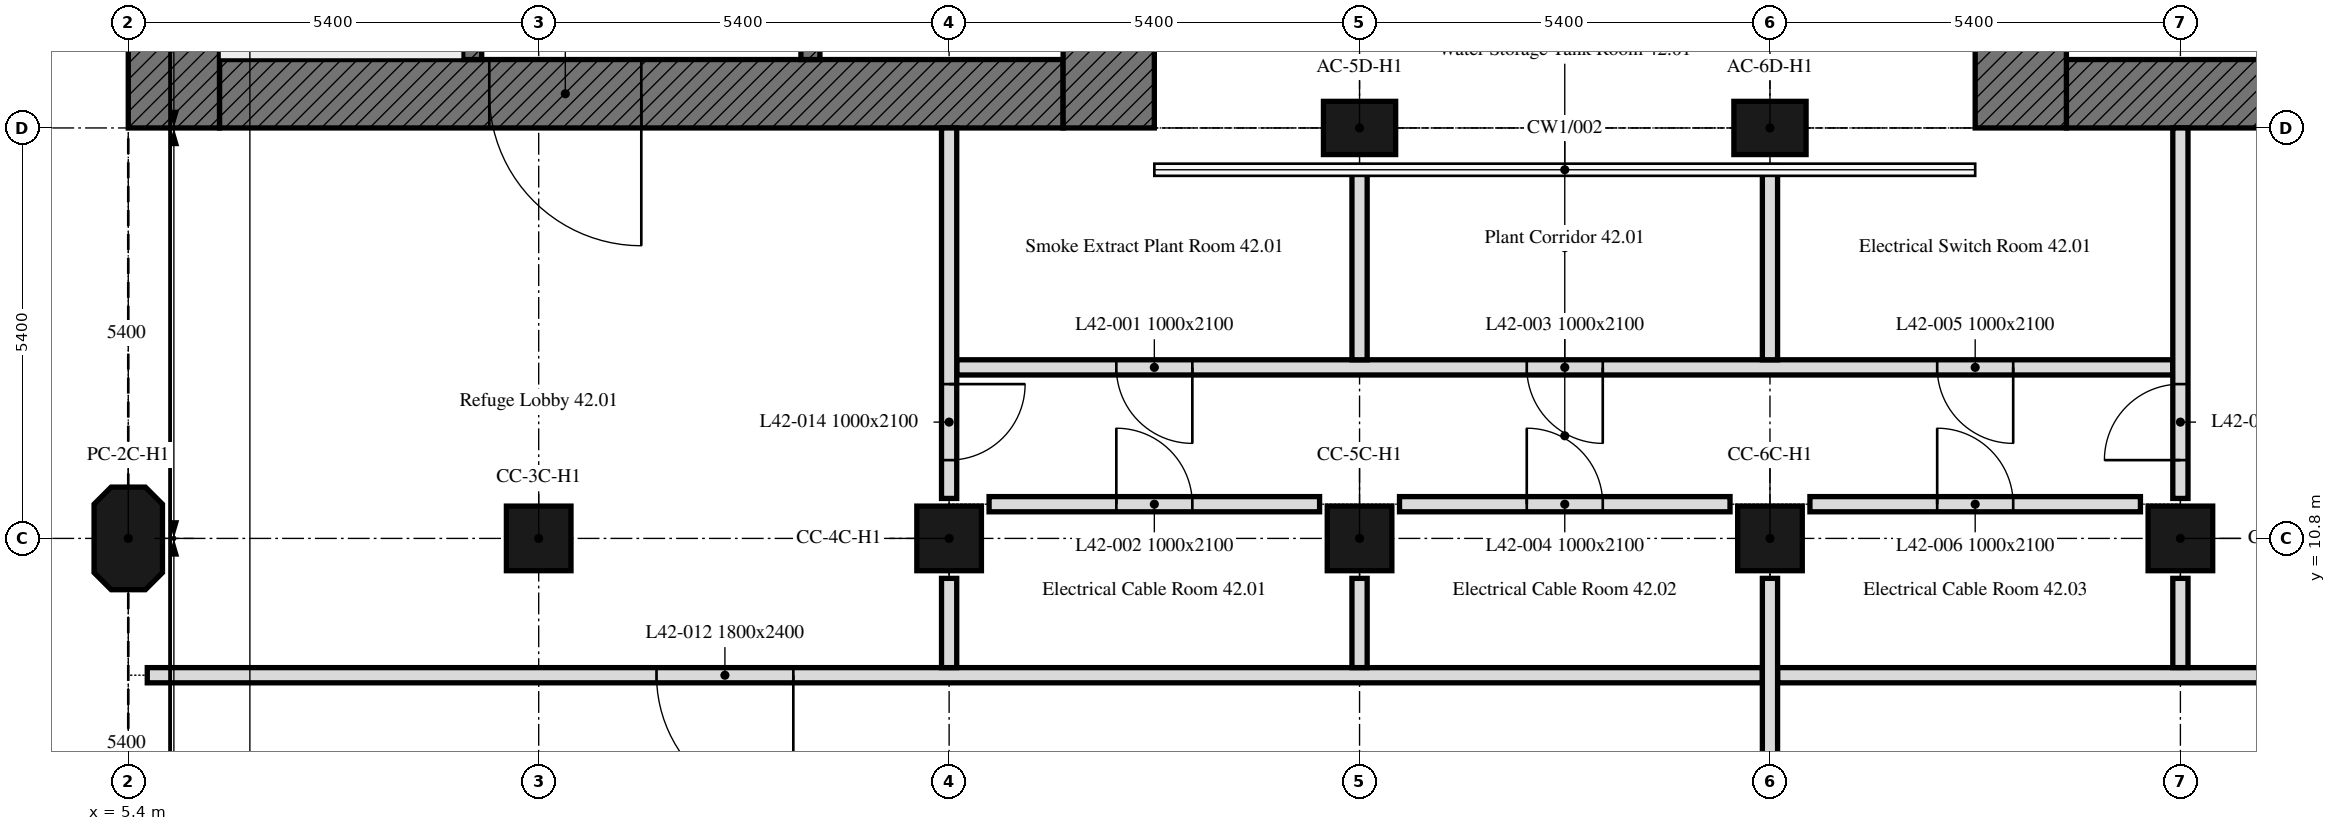
"""IFC4 building model, lengths in metres.
Left out: names, types, materials, properties, quantities, classifications, styles, units other than length and angle.
Written with IfcOpenShell. Run it as: python <this file> out.ifc"""

import sys

from ifc_helpers import new_model, si_unit, direction, frame, frame_2d, origin, origin_2d, place, context, subcontext, project, spatial, polyline, rectangle, outline, extrude, element, fill, save


model = new_model("IFC4")
c1 = context("Model", 3, precision=1e-05, world=origin(), true_north=direction((0.0, 1.0)))
c2 = subcontext(c1, "Body", "Model", "MODEL_VIEW")
j1 = project(units=[si_unit("LENGTHUNIT", "METRE"), si_unit("PLANEANGLEUNIT", "RADIAN")], contexts=[c1])
p1 = place(None, origin())
s1 = spatial("IfcSite", under=j1, at=p1, CompositionType="ELEMENT")
p2 = place(p1, origin())
s2 = spatial("IfcBuilding", under=s1, at=p2, CompositionType="ELEMENT")
p3 = place(p2, frame((0.0, 0.0, 175.9)))
s3 = spatial("IfcBuildingStorey", under=s2, at=p3, CompositionType="ELEMENT", Elevation=175.9)
p4 = place(p3, frame((5.4, 10.8, 0.0), z_axis=(0.0, 0.0, 1.0), x_axis=(0.0, 1.0, 0.0)))
e1 = element("IfcColumn", 1, at=p4, inside=s3, PredefinedType="COLUMN", context=c2, shape_type="SweptSolid", body=[
    extrude(outline(polyline([(-0.45, -0.45), (0.45, -0.45), (0.675, -0.225), (0.675, 0.225), (0.45, 0.45), (-0.45, 0.45), (-0.675, 0.225), (-0.675, -0.225), (-0.45, -0.45)])), origin(), (0.0, 0.0, 1.0), 4.5),
])
for number, where, z_axis, x_axis in (
    (2, (10.8, 10.8, 0.0), (0.0, 0.0, 1.0), (1.0, 0.0, 0.0)),
    (3, (16.2, 10.8, 0.0), (0.0, 0.0, 1.0), (1.0, 0.0, 0.0)),
    (4, (21.6, 10.8, 0.0), (0.0, 0.0, 1.0), (1.0, 0.0, 0.0)),
    (5, (27.0, 10.8, 0.0), (0.0, 0.0, 1.0), (1.0, 0.0, 0.0)),
    (6, (32.4, 10.8, 0.0), (0.0, 0.0, 1.0), (1.0, 0.0, 0.0)),
):
    element("IfcColumn", number, at=place(p3, frame(where, z_axis=z_axis, x_axis=x_axis)), inside=s3, PredefinedType="COLUMN", context=c2, shape_type="SweptSolid", body=[
        extrude(rectangle(XDim=0.85, YDim=0.85, at=origin_2d()), origin(), (0.0, 0.0, 1.0), 4.5),
    ])
for number, where, z_axis, x_axis in (
    (7, (21.6, 16.2, 0.0), (0.0, 0.0, 1.0), (1.0, 0.0, 0.0)),
    (8, (27.0, 16.2, 0.0), (0.0, 0.0, 1.0), (1.0, 0.0, 0.0)),
):
    element("IfcColumn", number, at=place(p3, frame(where, z_axis=z_axis, x_axis=x_axis)), inside=s3, PredefinedType="COLUMN", context=c2, shape_type="SweptSolid", body=[
        extrude(rectangle(XDim=0.95, YDim=0.7, at=origin_2d()), origin(), (0.0, 0.0, 1.0), 4.5),
    ])
p5 = place(p3, frame((17.7, 16.65, 0.0), z_axis=(0.0, 0.0, 1.0), x_axis=(-1.0, 0.0, 0.0)))
e9 = element("IfcWall", 9, at=p5, inside=s3, PredefinedType="SOLIDWALL", context=c2, shape_type="SweptSolid", body=[
    extrude(rectangle(XDim=11.1, YDim=0.9, at=frame_2d((5.55, 0.0))), origin(), (0.0, 0.0, 1.0), 4.5),
])
p6 = place(p5, frame((5.55, 0.0, 0.0)))
e10 = element("IfcOpeningElement", 10, at=p6, cuts=e9, PredefinedType="OPENING", context=c2, shape_type="SweptSolid", body=[
    extrude(rectangle(XDim=2.0, YDim=2.4, at=frame_2d((1.0, 1.2))), frame((0.0, 0.45, 0.0), z_axis=(0.0, -1.0, 0.0), x_axis=(1.0, 0.0, 0.0)), (0.0, 0.0, 1.0), 0.9),
])
for number, where, z_axis, x_axis in (
    (11, (6.0, 16.2, 0.0), (0.0, 0.0, 1.0), (0.0, 1.0, 0.0)),
    (12, (18.3, 32.4, 0.0), (0.0, 0.0, 1.0), (0.0, -1.0, 0.0)),
):
    element("IfcWall", number, at=place(p3, frame(where, z_axis=z_axis, x_axis=x_axis)), inside=s3, PredefinedType="SOLIDWALL", context=c2, shape_type="SweptSolid", body=[
        extrude(rectangle(XDim=16.2, YDim=1.2, at=frame_2d((8.1, 0.0))), origin(), (0.0, 0.0, 1.0), 4.5),
    ])
p7 = place(p3, frame((9.925, 17.1, 0.0), z_axis=(0.0, 0.0, 1.0), x_axis=(0.0, 1.0, 0.0)))
e13 = element("IfcWall", 13, at=p7, inside=s3, PredefinedType="SOLIDWALL", context=c2, shape_type="SweptSolid", body=[
    extrude(rectangle(XDim=14.4, YDim=0.25, at=frame_2d((7.2, 0.0))), origin(), (0.0, 0.0, 1.0), 4.5),
])
p8 = place(p7, frame((4.6, 0.0, 0.0)))
e14 = element("IfcOpeningElement", 14, at=p8, cuts=e13, PredefinedType="OPENING", context=c2, shape_type="SweptSolid", body=[
    extrude(rectangle(XDim=1.0, YDim=2.1, at=frame_2d((0.5, 1.05))), frame((0.0, 0.125, 0.0), z_axis=(0.0, -1.0, 0.0), x_axis=(1.0, 0.0, 0.0)), (0.0, 0.0, 1.0), 0.25),
])
p9 = place(p7, frame((7.062, 0.0, 0.0)))
e15 = element("IfcOpeningElement", 15, at=p9, cuts=e13, PredefinedType="OPENING", context=c2, shape_type="SweptSolid", body=[
    extrude(rectangle(XDim=1.2, YDim=2.1, at=frame_2d((0.6, 1.05))), frame((0.0, 0.125, 0.0), z_axis=(0.0, -1.0, 0.0), x_axis=(1.0, 0.0, 0.0)), (0.0, 0.0, 1.0), 0.25),
])
p10 = place(p7, frame((9.853, 0.0, 0.0)))
e16 = element("IfcOpeningElement", 16, at=p10, cuts=e13, PredefinedType="OPENING", context=c2, shape_type="SweptSolid", body=[
    extrude(rectangle(XDim=0.9, YDim=2.1, at=frame_2d((0.45, 1.05))), frame((0.0, 0.125, 0.0), z_axis=(0.0, -1.0, 0.0), x_axis=(1.0, 0.0, 0.0)), (0.0, 0.0, 1.0), 0.25),
])
p11 = place(p7, frame((11.667, 0.0, 0.0)))
e17 = element("IfcOpeningElement", 17, at=p11, cuts=e13, PredefinedType="OPENING", context=c2, shape_type="SweptSolid", body=[
    extrude(rectangle(XDim=0.9, YDim=2.1, at=frame_2d((0.45, 1.05))), frame((0.0, 0.125, 0.0), z_axis=(0.0, -1.0, 0.0), x_axis=(1.0, 0.0, 0.0)), (0.0, 0.0, 1.0), 0.25),
])
p12 = place(p7, frame((13.227, 0.0, 0.0)))
e18 = element("IfcOpeningElement", 18, at=p12, cuts=e13, PredefinedType="OPENING", context=c2, shape_type="SweptSolid", body=[
    extrude(rectangle(XDim=0.9, YDim=2.1, at=frame_2d((0.45, 1.05))), frame((0.0, 0.125, 0.0), z_axis=(0.0, -1.0, 0.0), x_axis=(1.0, 0.0, 0.0)), (0.0, 0.0, 1.0), 0.25),
])
p13 = place(p3, frame((14.375, 17.1, 0.0), z_axis=(0.0, 0.0, 1.0), x_axis=(0.0, 1.0, 0.0)))
e19 = element("IfcWall", 19, at=p13, inside=s3, PredefinedType="SOLIDWALL", context=c2, shape_type="SweptSolid", body=[
    extrude(rectangle(XDim=14.4, YDim=0.25, at=frame_2d((7.2, 0.0))), origin(), (0.0, 0.0, 1.0), 4.5),
])
p14 = place(p13, frame((13.15, 0.0, 0.0)))
e20 = element("IfcOpeningElement", 20, at=p14, cuts=e19, PredefinedType="OPENING", context=c2, shape_type="SweptSolid", body=[
    extrude(rectangle(XDim=1.0, YDim=2.1, at=frame_2d((0.5, 1.05))), frame((0.0, 0.125, 0.0), z_axis=(0.0, -1.0, 0.0), x_axis=(1.0, 0.0, 0.0)), (0.0, 0.0, 1.0), 0.25),
])
p15 = place(p13, frame((3.25, 0.0, 0.0)))
e21 = element("IfcOpeningElement", 21, at=p15, cuts=e19, PredefinedType="OPENING", context=c2, shape_type="SweptSolid", body=[
    extrude(rectangle(XDim=0.9, YDim=2.1, at=frame_2d((0.45, 1.05))), frame((0.0, 0.125, 0.0), z_axis=(0.0, -1.0, 0.0), x_axis=(1.0, 0.0, 0.0)), (0.0, 0.0, 1.0), 0.25),
])
p16 = place(p3, frame((42.0, 16.65, 0.0), z_axis=(0.0, 0.0, 1.0), x_axis=(-1.0, 0.0, 0.0)))
e22 = element("IfcWall", 22, at=p16, inside=s3, PredefinedType="SOLIDWALL", context=c2, shape_type="SweptSolid", body=[
    extrude(rectangle(XDim=11.1, YDim=0.9, at=frame_2d((5.55, 0.0))), origin(), (0.0, 0.0, 1.0), 4.5),
])
p17 = place(p16, frame((3.55, 0.0, 0.0)))
e23 = element("IfcOpeningElement", 23, at=p17, cuts=e22, PredefinedType="OPENING", context=c2, shape_type="SweptSolid", body=[
    extrude(rectangle(XDim=2.0, YDim=2.4, at=frame_2d((1.0, 1.2))), frame((0.0, 0.45, 0.0), z_axis=(0.0, -1.0, 0.0), x_axis=(1.0, 0.0, 0.0)), (0.0, 0.0, 1.0), 0.9),
])
p18 = place(p3, frame((30.3, 16.2, 0.0), z_axis=(0.0, 0.0, 1.0), x_axis=(0.0, 1.0, 0.0)))
e24 = element("IfcWall", 24, at=p18, inside=s3, PredefinedType="SOLIDWALL", context=c2, shape_type="SweptSolid", body=[
    extrude(rectangle(XDim=16.2, YDim=1.2, at=frame_2d((8.1, 0.0))), origin(), (0.0, 0.0, 1.0), 4.5),
])
p19 = place(p3, frame((16.726, 11.25, 0.0), z_axis=(0.0, 0.0, 1.0), x_axis=(1.0, 0.0, 0.0)))
e25 = element("IfcWall", 25, at=p19, inside=s3, PredefinedType="PARTITIONING", context=c2, shape_type="SweptSolid", body=[
    extrude(rectangle(XDim=4.349, YDim=0.2, at=frame_2d((2.174, 0.0))), origin(), (0.0, 0.0, 1.0), 4.5),
])
p20 = place(p19, frame((1.674, 0.0, 0.0)))
e26 = element("IfcOpeningElement", 26, at=p20, cuts=e25, PredefinedType="OPENING", context=c2, shape_type="SweptSolid", body=[
    extrude(rectangle(XDim=1.0, YDim=2.1, at=frame_2d((0.5, 1.05))), frame((0.0, 0.1, 0.0), z_axis=(0.0, -1.0, 0.0), x_axis=(1.0, 0.0, 0.0)), (0.0, 0.0, 1.0), 0.2),
])
p21 = place(p3, frame((22.126, 11.25, 0.0), z_axis=(0.0, 0.0, 1.0), x_axis=(1.0, 0.0, 0.0)))
e27 = element("IfcWall", 27, at=p21, inside=s3, PredefinedType="PARTITIONING", context=c2, shape_type="SweptSolid", body=[
    extrude(rectangle(XDim=4.349, YDim=0.2, at=frame_2d((2.174, 0.0))), origin(), (0.0, 0.0, 1.0), 4.5),
])
p22 = place(p21, frame((1.674, 0.0, 0.0)))
e28 = element("IfcOpeningElement", 28, at=p22, cuts=e27, PredefinedType="OPENING", context=c2, shape_type="SweptSolid", body=[
    extrude(rectangle(XDim=1.0, YDim=2.1, at=frame_2d((0.5, 1.05))), frame((0.0, 0.1, 0.0), z_axis=(0.0, -1.0, 0.0), x_axis=(1.0, 0.0, 0.0)), (0.0, 0.0, 1.0), 0.2),
])
p23 = place(p3, frame((27.526, 11.25, 0.0), z_axis=(0.0, 0.0, 1.0), x_axis=(1.0, 0.0, 0.0)))
e29 = element("IfcWall", 29, at=p23, inside=s3, PredefinedType="PARTITIONING", context=c2, shape_type="SweptSolid", body=[
    extrude(rectangle(XDim=4.349, YDim=0.2, at=frame_2d((2.174, 0.0))), origin(), (0.0, 0.0, 1.0), 4.5),
])
p24 = place(p23, frame((1.674, 0.0, 0.0)))
e30 = element("IfcOpeningElement", 30, at=p24, cuts=e29, PredefinedType="OPENING", context=c2, shape_type="SweptSolid", body=[
    extrude(rectangle(XDim=1.0, YDim=2.1, at=frame_2d((0.5, 1.05))), frame((0.0, 0.1, 0.0), z_axis=(0.0, -1.0, 0.0), x_axis=(1.0, 0.0, 0.0)), (0.0, 0.0, 1.0), 0.2),
])
p25 = place(p3, frame((32.3, 13.05, 0.0), z_axis=(0.0, 0.0, 1.0), x_axis=(-1.0, 0.0, 0.0)))
e31 = element("IfcWall", 31, at=p25, inside=s3, PredefinedType="PARTITIONING", context=c2, shape_type="SweptSolid", body=[
    extrude(rectangle(XDim=16.0, YDim=0.2, at=frame_2d((8.0, 0.0))), origin(), (0.0, 0.0, 1.0), 3.9),
])
p26 = place(p25, frame((12.9, 0.0, 0.0)))
e32 = element("IfcOpeningElement", 32, at=p26, cuts=e31, PredefinedType="OPENING", context=c2, shape_type="SweptSolid", body=[
    extrude(rectangle(XDim=1.0, YDim=2.1, at=frame_2d((0.5, 1.05))), frame((0.0, 0.1, 0.0), z_axis=(0.0, -1.0, 0.0), x_axis=(1.0, 0.0, 0.0)), (0.0, 0.0, 1.0), 0.2),
])
p27 = place(p25, frame((7.5, 0.0, 0.0)))
e33 = element("IfcOpeningElement", 33, at=p27, cuts=e31, PredefinedType="OPENING", context=c2, shape_type="SweptSolid", body=[
    extrude(rectangle(XDim=1.0, YDim=2.1, at=frame_2d((0.5, 1.05))), frame((0.0, 0.1, 0.0), z_axis=(0.0, -1.0, 0.0), x_axis=(1.0, 0.0, 0.0)), (0.0, 0.0, 1.0), 0.2),
])
p28 = place(p25, frame((2.1, 0.0, 0.0)))
e34 = element("IfcOpeningElement", 34, at=p28, cuts=e31, PredefinedType="OPENING", context=c2, shape_type="SweptSolid", body=[
    extrude(rectangle(XDim=1.0, YDim=2.1, at=frame_2d((0.5, 1.05))), frame((0.0, 0.1, 0.0), z_axis=(0.0, -1.0, 0.0), x_axis=(1.0, 0.0, 0.0)), (0.0, 0.0, 1.0), 0.2),
])
p29 = place(p3, frame((26.9, 9.0, 0.0), z_axis=(0.0, 0.0, 1.0), x_axis=(-1.0, 0.0, 0.0)))
e35 = element("IfcWall", 35, at=p29, inside=s3, PredefinedType="PARTITIONING", context=c2, shape_type="SweptSolid", body=[
    extrude(rectangle(XDim=21.25, YDim=0.2, at=frame_2d((10.625, 0.0))), origin(), (0.0, 0.0, 1.0), 3.9),
])
p30 = place(p29, frame((12.75, 0.0, 0.0)))
e36 = element("IfcOpeningElement", 36, at=p30, cuts=e35, PredefinedType="OPENING", context=c2, shape_type="SweptSolid", body=[
    extrude(rectangle(XDim=1.8, YDim=2.4, at=frame_2d((0.9, 1.2))), frame((0.0, 0.1, 0.0), z_axis=(0.0, -1.0, 0.0), x_axis=(1.0, 0.0, 0.0)), (0.0, 0.0, 1.0), 0.2),
])
p31 = place(p3, frame((43.1, 9.0, 0.0), z_axis=(0.0, 0.0, 1.0), x_axis=(-1.0, 0.0, 0.0)))
e37 = element("IfcWall", 37, at=p31, inside=s3, PredefinedType="PARTITIONING", context=c2, shape_type="SweptSolid", body=[
    extrude(rectangle(XDim=16.0, YDim=0.2, at=frame_2d((8.0, 0.0))), origin(), (0.0, 0.0, 1.0), 3.9),
])
p32 = place(p31, frame((1.95, 0.0, 0.0)))
e38 = element("IfcOpeningElement", 38, at=p32, cuts=e37, PredefinedType="OPENING", context=c2, shape_type="SweptSolid", body=[
    extrude(rectangle(XDim=1.8, YDim=2.4, at=frame_2d((0.9, 1.2))), frame((0.0, 0.1, 0.0), z_axis=(0.0, -1.0, 0.0), x_axis=(1.0, 0.0, 0.0)), (0.0, 0.0, 1.0), 0.2),
])
p33 = place(p3, frame((16.2, 9.1, 0.0), z_axis=(0.0, 0.0, 1.0), x_axis=(0.0, 1.0, 0.0)))
e39 = element("IfcWall", 39, at=p33, inside=s3, PredefinedType="PARTITIONING", context=c2, shape_type="SweptSolid", body=[
    extrude(rectangle(XDim=1.174, YDim=0.2, at=frame_2d((0.587, 0.0))), origin(), (0.0, 0.0, 1.0), 3.9),
])
p34 = place(p3, frame((16.2, 16.2, 0.0), z_axis=(0.0, 0.0, 1.0), x_axis=(0.0, -1.0, 0.0)))
e40 = element("IfcWall", 40, at=p34, inside=s3, PredefinedType="PARTITIONING", context=c2, shape_type="SweptSolid", body=[
    extrude(rectangle(XDim=4.874, YDim=0.2, at=frame_2d((2.437, 0.0))), origin(), (0.0, 0.0, 1.0), 3.9),
])
p35 = place(p34, frame((3.37, 0.0, 0.0)))
e41 = element("IfcOpeningElement", 41, at=p35, cuts=e40, PredefinedType="OPENING", context=c2, shape_type="SweptSolid", body=[
    extrude(rectangle(XDim=1.0, YDim=2.1, at=frame_2d((0.5, 1.05))), frame((0.0, 0.1, 0.0), z_axis=(0.0, -1.0, 0.0), x_axis=(1.0, 0.0, 0.0)), (0.0, 0.0, 1.0), 0.2),
])
p36 = place(p3, frame((32.4, 11.326, 0.0), z_axis=(0.0, 0.0, 1.0), x_axis=(0.0, 1.0, 0.0)))
e42 = element("IfcWall", 42, at=p36, inside=s3, PredefinedType="PARTITIONING", context=c2, shape_type="SweptSolid", body=[
    extrude(rectangle(XDim=4.874, YDim=0.2, at=frame_2d((2.437, 0.0))), origin(), (0.0, 0.0, 1.0), 3.9),
])
p37 = place(p36, frame((0.504, 0.0, 0.0)))
e43 = element("IfcOpeningElement", 43, at=p37, cuts=e42, PredefinedType="OPENING", context=c2, shape_type="SweptSolid", body=[
    extrude(rectangle(XDim=1.0, YDim=2.1, at=frame_2d((0.5, 1.05))), frame((0.0, 0.1, 0.0), z_axis=(0.0, -1.0, 0.0), x_axis=(1.0, 0.0, 0.0)), (0.0, 0.0, 1.0), 0.2),
])
p38 = place(p3, frame((32.4, 10.274, 0.0), z_axis=(0.0, 0.0, 1.0), x_axis=(0.0, -1.0, 0.0)))
e44 = element("IfcWall", 44, at=p38, inside=s3, PredefinedType="PARTITIONING", context=c2, shape_type="SweptSolid", body=[
    extrude(rectangle(XDim=1.174, YDim=0.2, at=frame_2d((0.587, 0.0))), origin(), (0.0, 0.0, 1.0), 3.9),
])
p39 = place(p3, frame((21.6, 13.15, 0.0), z_axis=(0.0, 0.0, 1.0), x_axis=(0.0, 1.0, 0.0)))
e45 = element("IfcWall", 45, at=p39, inside=s3, PredefinedType="PARTITIONING", context=c2, shape_type="SweptSolid", body=[
    extrude(rectangle(XDim=2.555, YDim=0.2, at=frame_2d((1.278, 0.0))), origin(), (0.0, 0.0, 1.0), 3.9),
])
p40 = place(p3, frame((21.6, 9.1, 0.0), z_axis=(0.0, 0.0, 1.0), x_axis=(0.0, 1.0, 0.0)))
e46 = element("IfcWall", 46, at=p40, inside=s3, PredefinedType="PARTITIONING", context=c2, shape_type="SweptSolid", body=[
    extrude(rectangle(XDim=1.174, YDim=0.2, at=frame_2d((0.587, 0.0))), origin(), (0.0, 0.0, 1.0), 3.9),
])
p41 = place(p3, frame((27.0, 13.15, 0.0), z_axis=(0.0, 0.0, 1.0), x_axis=(0.0, 1.0, 0.0)))
e47 = element("IfcWall", 47, at=p41, inside=s3, PredefinedType="PARTITIONING", context=c2, shape_type="SweptSolid", body=[
    extrude(rectangle(XDim=2.555, YDim=0.2, at=frame_2d((1.278, 0.0))), origin(), (0.0, 0.0, 1.0), 3.9),
])
p42 = place(p3, frame((27.0, 5.926, 0.0), z_axis=(0.0, 0.0, 1.0), x_axis=(0.0, 1.0, 0.0)))
e48 = element("IfcWall", 48, at=p42, inside=s3, PredefinedType="PARTITIONING", context=c2, shape_type="SweptSolid", body=[
    extrude(rectangle(XDim=4.349, YDim=0.2, at=frame_2d((2.174, 0.0))), origin(), (0.0, 0.0, 1.0), 3.9),
])
p43 = place(p6, origin())
e49 = element("IfcDoor", 49, at=p43, inside=s3, OperationType="DOUBLE_DOOR_SINGLE_SWING", PredefinedType="DOOR", context=c2, shape_type="SweptSolid", body=[
    extrude(rectangle(XDim=2.0, YDim=2.4, at=frame_2d((1.0, 1.2))), frame((0.0, 0.025, 0.0), z_axis=(0.0, -1.0, 0.0), x_axis=(1.0, 0.0, 0.0)), (0.0, 0.0, 1.0), 0.05),
])
fill(e10, e49)
p44 = place(p26, origin())
e50 = element("IfcDoor", 50, at=p44, inside=s3, OperationType="SINGLE_SWING_LEFT", PredefinedType="DOOR", context=c2, shape_type="SweptSolid", body=[
    extrude(rectangle(XDim=1.0, YDim=2.1, at=frame_2d((0.5, 1.05))), frame((0.0, 0.025, 0.0), z_axis=(0.0, -1.0, 0.0), x_axis=(1.0, 0.0, 0.0)), (0.0, 0.0, 1.0), 0.05),
])
fill(e32, e50)
p45 = place(p20, origin())
e51 = element("IfcDoor", 51, at=p45, inside=s3, OperationType="SINGLE_SWING_LEFT", PredefinedType="DOOR", context=c2, shape_type="SweptSolid", body=[
    extrude(rectangle(XDim=1.0, YDim=2.1, at=frame_2d((0.5, 1.05))), frame((0.0, 0.025, 0.0), z_axis=(0.0, -1.0, 0.0), x_axis=(1.0, 0.0, 0.0)), (0.0, 0.0, 1.0), 0.05),
])
fill(e26, e51)
p46 = place(p27, origin())
e52 = element("IfcDoor", 52, at=p46, inside=s3, OperationType="SINGLE_SWING_LEFT", PredefinedType="DOOR", context=c2, shape_type="SweptSolid", body=[
    extrude(rectangle(XDim=1.0, YDim=2.1, at=frame_2d((0.5, 1.05))), frame((0.0, 0.025, 0.0), z_axis=(0.0, -1.0, 0.0), x_axis=(1.0, 0.0, 0.0)), (0.0, 0.0, 1.0), 0.05),
])
fill(e33, e52)
p47 = place(p22, origin())
e53 = element("IfcDoor", 53, at=p47, inside=s3, OperationType="SINGLE_SWING_LEFT", PredefinedType="DOOR", context=c2, shape_type="SweptSolid", body=[
    extrude(rectangle(XDim=1.0, YDim=2.1, at=frame_2d((0.5, 1.05))), frame((0.0, 0.025, 0.0), z_axis=(0.0, -1.0, 0.0), x_axis=(1.0, 0.0, 0.0)), (0.0, 0.0, 1.0), 0.05),
])
fill(e28, e53)
p48 = place(p28, origin())
e54 = element("IfcDoor", 54, at=p48, inside=s3, OperationType="SINGLE_SWING_LEFT", PredefinedType="DOOR", context=c2, shape_type="SweptSolid", body=[
    extrude(rectangle(XDim=1.0, YDim=2.1, at=frame_2d((0.5, 1.05))), frame((0.0, 0.025, 0.0), z_axis=(0.0, -1.0, 0.0), x_axis=(1.0, 0.0, 0.0)), (0.0, 0.0, 1.0), 0.05),
])
fill(e34, e54)
p49 = place(p24, origin())
e55 = element("IfcDoor", 55, at=p49, inside=s3, OperationType="SINGLE_SWING_LEFT", PredefinedType="DOOR", context=c2, shape_type="SweptSolid", body=[
    extrude(rectangle(XDim=1.0, YDim=2.1, at=frame_2d((0.5, 1.05))), frame((0.0, 0.025, 0.0), z_axis=(0.0, -1.0, 0.0), x_axis=(1.0, 0.0, 0.0)), (0.0, 0.0, 1.0), 0.05),
])
fill(e30, e55)
p50 = place(p30, origin())
e56 = element("IfcDoor", 56, at=p50, inside=s3, OperationType="DOUBLE_DOOR_SINGLE_SWING", PredefinedType="DOOR", context=c2, shape_type="SweptSolid", body=[
    extrude(rectangle(XDim=1.8, YDim=2.4, at=frame_2d((0.9, 1.2))), frame((0.0, 0.025, 0.0), z_axis=(0.0, -1.0, 0.0), x_axis=(1.0, 0.0, 0.0)), (0.0, 0.0, 1.0), 0.05),
])
fill(e36, e56)
p51 = place(p35, origin())
e57 = element("IfcDoor", 57, at=p51, inside=s3, OperationType="SINGLE_SWING_RIGHT", PredefinedType="DOOR", context=c2, shape_type="SweptSolid", body=[
    extrude(rectangle(XDim=1.0, YDim=2.1, at=frame_2d((0.5, 1.05))), frame((0.0, 0.025, 0.0), z_axis=(0.0, -1.0, 0.0), x_axis=(1.0, 0.0, 0.0)), (0.0, 0.0, 1.0), 0.05),
])
fill(e41, e57)
p52 = place(p37, origin())
e58 = element("IfcDoor", 58, at=p52, inside=s3, OperationType="SINGLE_SWING_RIGHT", PredefinedType="DOOR", context=c2, shape_type="SweptSolid", body=[
    extrude(rectangle(XDim=1.0, YDim=2.1, at=frame_2d((0.5, 1.05))), frame((0.0, 0.025, 0.0), z_axis=(0.0, -1.0, 0.0), x_axis=(1.0, 0.0, 0.0)), (0.0, 0.0, 1.0), 0.05),
])
fill(e43, e58)
save(model, sys.argv[1])
